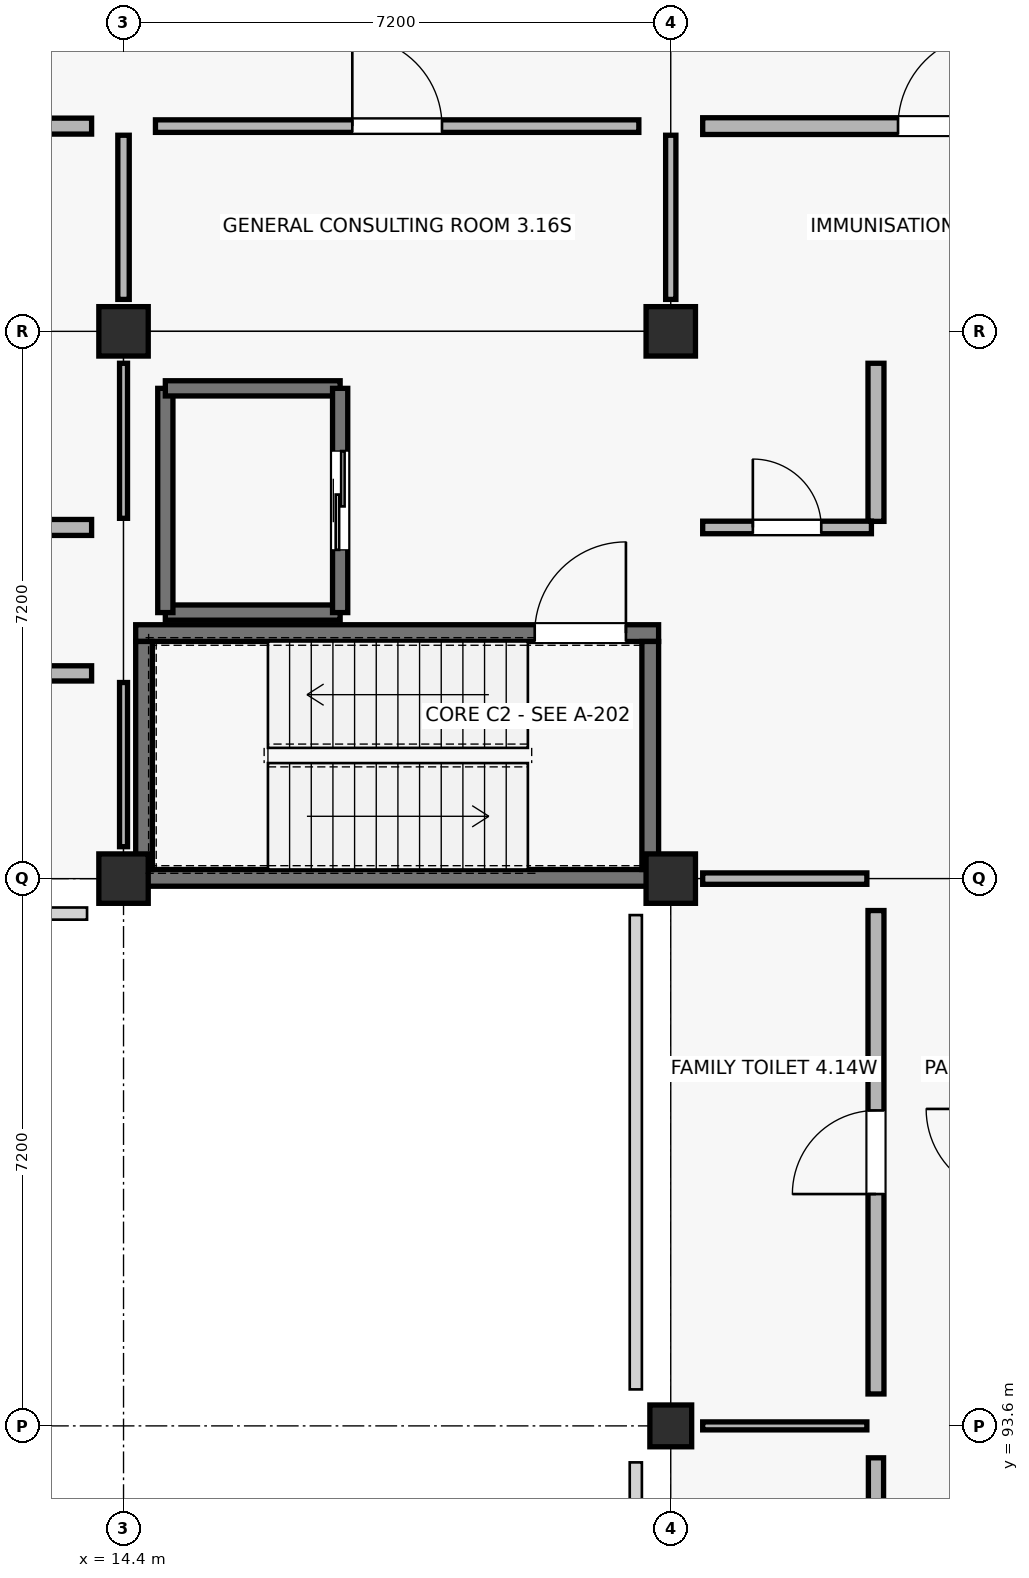
"""IFC4 building model, lengths in metres.
Left out: names, types, materials, properties, quantities, classifications, styles, units other than length and angle.
Written with IfcOpenShell. Run it as: python <this file> out.ifc"""

import sys

from ifc_helpers import new_model, si_unit, direction, frame, frame_2d, origin, origin_2d, place, context, subcontext, project, spatial, rectangle, extrude, element, fill, save


model = new_model("IFC4")
c1 = context("Model", 3, precision=1e-05, world=origin(), true_north=direction((0.0, 1.0)))
c2 = subcontext(c1, "Body", "Model", "MODEL_VIEW")
j1 = project(units=[si_unit("LENGTHUNIT", "METRE"), si_unit("PLANEANGLEUNIT", "RADIAN")], contexts=[c1])
p1 = place(None, origin())
s1 = spatial("IfcSite", under=j1, at=p1, CompositionType="ELEMENT")
p2 = place(p1, origin())
s2 = spatial("IfcBuilding", under=s1, at=p2, CompositionType="ELEMENT")
p3 = place(p2, frame((0.0, 0.0, 9.0)))
s3 = spatial("IfcBuildingStorey", under=s2, at=p3, CompositionType="ELEMENT", Elevation=9.0)
for number, where, z_axis, x_axis in (
    (1, (14.4, 100.8, 0.0), (0.0, 0.0, 1.0), (1.0, 0.0, 0.0)),
    (2, (14.4, 108.0, 0.0), (0.0, 0.0, 1.0), (1.0, 0.0, 0.0)),
):
    element("IfcColumn", number, at=place(p3, frame(where, z_axis=z_axis, x_axis=x_axis)), inside=s3, PredefinedType="COLUMN", context=c2, shape_type="SweptSolid", body=[
        extrude(rectangle(XDim=0.65, YDim=0.65, at=origin_2d()), origin(), (0.0, 0.0, 1.0), 4.5),
    ])
p4 = place(p3, frame((21.6, 93.6, 0.0), z_axis=(0.0, 0.0, 1.0), x_axis=(1.0, 0.0, 0.0)))
e3 = element("IfcColumn", 3, at=p4, inside=s3, PredefinedType="COLUMN", context=c2, shape_type="SweptSolid", body=[
    extrude(rectangle(XDim=0.55, YDim=0.55, at=origin_2d()), origin(), (0.0, 0.0, 1.0), 4.5),
])
for number, where, z_axis, x_axis in (
    (4, (21.6, 100.8, 0.0), (0.0, 0.0, 1.0), (1.0, 0.0, 0.0)),
    (5, (21.6, 108.0, 0.0), (0.0, 0.0, 1.0), (1.0, 0.0, 0.0)),
):
    element("IfcColumn", number, at=place(p3, frame(where, z_axis=z_axis, x_axis=x_axis)), inside=s3, PredefinedType="COLUMN", context=c2, shape_type="SweptSolid", body=[
        extrude(rectangle(XDim=0.65, YDim=0.65, at=origin_2d()), origin(), (0.0, 0.0, 1.0), 4.5),
    ])
p5 = place(p3, frame((14.56, 100.81, 0.0), z_axis=(0.0, 0.0, 1.0), x_axis=(1.0, 0.0, 0.0)))
e6 = element("IfcWall", 6, at=p5, inside=s3, PredefinedType="SHEAR", context=c2, shape_type="SweptSolid", body=[
    extrude(rectangle(XDim=6.88, YDim=0.22, at=frame_2d((3.44, 0.0))), origin(), (0.0, 0.0, 1.0), 4.24),
])
p6 = place(p3, frame((14.56, 104.03, 0.0), z_axis=(0.0, 0.0, 1.0), x_axis=(1.0, 0.0, 0.0)))
e7 = element("IfcWall", 7, at=p6, inside=s3, PredefinedType="SHEAR", context=c2, shape_type="SweptSolid", body=[
    extrude(rectangle(XDim=6.88, YDim=0.22, at=frame_2d((3.44, 0.0))), origin(), (0.0, 0.0, 1.0), 4.24),
])
p7 = place(p6, frame((5.25, 0.0, 0.0)))
e8 = element("IfcOpeningElement", 8, at=p7, cuts=e7, PredefinedType="OPENING", context=c2, shape_type="SweptSolid", body=[
    extrude(rectangle(XDim=1.2, YDim=2.15, at=frame_2d((0.6, 1.075))), frame((0.0, 0.12, 0.0), z_axis=(0.0, -1.0, 0.0), x_axis=(1.0, 0.0, 0.0)), (0.0, 0.0, 1.0), 0.24),
])
for number, where, z_axis, x_axis in (
    (9, (14.67, 100.92, 0.0), (0.0, 0.0, 1.0), (0.0, 1.0, 0.0)),
    (10, (21.33, 100.92, 0.0), (0.0, 0.0, 1.0), (0.0, 1.0, 0.0)),
):
    element("IfcWall", number, at=place(p3, frame(where, z_axis=z_axis, x_axis=x_axis)), inside=s3, PredefinedType="SHEAR", context=c2, shape_type="SweptSolid", body=[
        extrude(rectangle(XDim=3.0, YDim=0.22, at=frame_2d((1.5, 0.0))), origin(), (0.0, 0.0, 1.0), 4.24),
    ])
p8 = place(p3, frame((14.95, 104.3, 0.0), z_axis=(0.0, 0.0, 1.0), x_axis=(1.0, 0.0, 0.0)))
e11 = element("IfcWall", 11, at=p8, inside=s3, PredefinedType="SHEAR", context=c2, shape_type="SweptSolid", body=[
    extrude(rectangle(XDim=2.3, YDim=0.2, at=frame_2d((1.15, 0.0))), origin(), (0.0, 0.0, 1.0), 4.24),
])
p9 = place(p3, frame((14.95, 104.3, 0.0), z_axis=(0.0, 0.0, 1.0), x_axis=(0.0, 1.0, 0.0)))
e12 = element("IfcWall", 12, at=p9, inside=s3, PredefinedType="SHEAR", context=c2, shape_type="SweptSolid", body=[
    extrude(rectangle(XDim=2.95, YDim=0.2, at=frame_2d((1.475, 0.0))), origin(), (0.0, 0.0, 1.0), 4.24),
])
p10 = place(p3, frame((14.95, 107.25, 0.0), z_axis=(0.0, 0.0, 1.0), x_axis=(1.0, 0.0, 0.0)))
e13 = element("IfcWall", 13, at=p10, inside=s3, PredefinedType="SHEAR", context=c2, shape_type="SweptSolid", body=[
    extrude(rectangle(XDim=2.3, YDim=0.2, at=frame_2d((1.15, 0.0))), origin(), (0.0, 0.0, 1.0), 4.24),
])
p11 = place(p3, frame((17.25, 104.3, 0.0), z_axis=(0.0, 0.0, 1.0), x_axis=(0.0, 1.0, 0.0)))
e14 = element("IfcWall", 14, at=p11, inside=s3, PredefinedType="SHEAR", context=c2, shape_type="SweptSolid", body=[
    extrude(rectangle(XDim=2.95, YDim=0.2, at=frame_2d((1.475, 0.0))), origin(), (0.0, 0.0, 1.0), 4.24),
])
p12 = place(p11, frame((0.825, 0.0, 0.0)))
e15 = element("IfcOpeningElement", 15, at=p12, cuts=e14, PredefinedType="OPENING", context=c2, shape_type="SweptSolid", body=[
    extrude(rectangle(XDim=1.3, YDim=2.15, at=frame_2d((0.65, 1.075))), frame((0.0, 0.11, 0.0), z_axis=(0.0, -1.0, 0.0), x_axis=(1.0, 0.0, 0.0)), (0.0, 0.0, 1.0), 0.22),
])
p13 = place(p3, frame((7.62, 103.5, 0.0), z_axis=(0.0, 0.0, 1.0), x_axis=(1.0, 0.0, 0.0)))
e16 = element("IfcWall", 16, at=p13, inside=s3, PredefinedType="SOLIDWALL", context=c2, shape_type="SweptSolid", body=[
    extrude(rectangle(XDim=6.36, YDim=0.2, at=frame_2d((3.18, 0.0))), origin(), (0.0, 0.0, 1.0), 3.38),
])
p14 = place(p13, frame((2.71, 0.0, 0.0)))
e17 = element("IfcOpeningElement", 17, at=p14, cuts=e16, PredefinedType="OPENING", context=c2, shape_type="SweptSolid", body=[
    extrude(rectangle(XDim=0.94, YDim=2.09, at=frame_2d((0.47, 1.045))), frame((0.0, 0.11, 0.0), z_axis=(0.0, -1.0, 0.0), x_axis=(1.0, 0.0, 0.0)), (0.0, 0.0, 1.0), 0.22),
])
p15 = place(p3, frame((14.4, 101.22, 0.0), z_axis=(0.0, 0.0, 1.0), x_axis=(0.0, 1.0, 0.0)))
e18 = element("IfcWall", 18, at=p15, inside=s3, PredefinedType="PARTITIONING", context=c2, shape_type="SweptSolid", body=[
    extrude(rectangle(XDim=2.16, YDim=0.105, at=frame_2d((1.08, 0.0))), origin(), (0.0, 0.0, 1.0), 3.38),
])
p16 = place(p3, frame((7.62, 105.42, 0.0), z_axis=(0.0, 0.0, 1.0), x_axis=(1.0, 0.0, 0.0)))
e19 = element("IfcWall", 19, at=p16, inside=s3, PredefinedType="PLUMBINGWALL", context=c2, shape_type="SweptSolid", body=[
    extrude(rectangle(XDim=6.36, YDim=0.21, at=frame_2d((3.18, 0.0))), origin(), (0.0, 0.0, 1.0), 3.38),
])
p17 = place(p16, frame((2.69, 0.0, 0.0)))
e20 = element("IfcOpeningElement", 20, at=p17, cuts=e19, PredefinedType="OPENING", context=c2, shape_type="SweptSolid", body=[
    extrude(rectangle(XDim=0.98, YDim=2.09, at=frame_2d((0.49, 1.045))), frame((0.0, 0.115, 0.0), z_axis=(0.0, -1.0, 0.0), x_axis=(1.0, 0.0, 0.0)), (0.0, 0.0, 1.0), 0.23),
])
p18 = place(p3, frame((14.4, 105.54, 0.0), z_axis=(0.0, 0.0, 1.0), x_axis=(0.0, 1.0, 0.0)))
e21 = element("IfcWall", 21, at=p18, inside=s3, PredefinedType="PARTITIONING", context=c2, shape_type="SweptSolid", body=[
    extrude(rectangle(XDim=2.04, YDim=0.105, at=frame_2d((1.02, 0.0))), origin(), (0.0, 0.0, 1.0), 3.38),
])
p19 = place(p3, frame((7.62, 110.7, 0.0), z_axis=(0.0, 0.0, 1.0), x_axis=(1.0, 0.0, 0.0)))
e22 = element("IfcWall", 22, at=p19, inside=s3, PredefinedType="PLUMBINGWALL", context=c2, shape_type="SweptSolid", body=[
    extrude(rectangle(XDim=6.36, YDim=0.21, at=frame_2d((3.18, 0.0))), origin(), (0.0, 0.0, 1.0), 3.38),
])
p20 = place(p19, frame((2.67, 0.0, 0.0)))
e23 = element("IfcOpeningElement", 23, at=p20, cuts=e22, PredefinedType="OPENING", context=c2, shape_type="SweptSolid", body=[
    extrude(rectangle(XDim=1.02, YDim=2.09, at=frame_2d((0.51, 1.045))), frame((0.0, 0.115, 0.0), z_axis=(0.0, -1.0, 0.0), x_axis=(1.0, 0.0, 0.0)), (0.0, 0.0, 1.0), 0.23),
])
p21 = place(p3, frame((14.4, 108.42, 0.0), z_axis=(0.0, 0.0, 1.0), x_axis=(0.0, 1.0, 0.0)))
e24 = element("IfcWall", 24, at=p21, inside=s3, PredefinedType="PARTITIONING", context=c2, shape_type="SweptSolid", body=[
    extrude(rectangle(XDim=2.16, YDim=0.15, at=frame_2d((1.08, 0.0))), origin(), (0.0, 0.0, 1.0), 3.38),
])
p22 = place(p3, frame((14.82, 110.7, 0.0), z_axis=(0.0, 0.0, 1.0), x_axis=(1.0, 0.0, 0.0)))
e25 = element("IfcWall", 25, at=p22, inside=s3, PredefinedType="PARTITIONING", context=c2, shape_type="SweptSolid", body=[
    extrude(rectangle(XDim=6.36, YDim=0.165, at=frame_2d((3.18, 0.0))), origin(), (0.0, 0.0, 1.0), 3.38),
])
p23 = place(p22, frame((2.59, 0.0, 0.0)))
e26 = element("IfcOpeningElement", 26, at=p23, cuts=e25, PredefinedType="OPENING", context=c2, shape_type="SweptSolid", body=[
    extrude(rectangle(XDim=1.18, YDim=2.09, at=frame_2d((0.59, 1.045))), frame((0.0, 0.093, 0.0), z_axis=(0.0, -1.0, 0.0), x_axis=(1.0, 0.0, 0.0)), (0.0, 0.0, 1.0), 0.185),
])
p24 = place(p3, frame((21.6, 108.42, 0.0), z_axis=(0.0, 0.0, 1.0), x_axis=(0.0, 1.0, 0.0)))
e27 = element("IfcWall", 27, at=p24, inside=s3, PredefinedType="PARTITIONING", context=c2, shape_type="SweptSolid", body=[
    extrude(rectangle(XDim=2.16, YDim=0.135, at=frame_2d((1.08, 0.0))), origin(), (0.0, 0.0, 1.0), 3.38),
])
p25 = place(p3, frame((24.3, 86.82, 0.0), z_axis=(0.0, 0.0, 1.0), x_axis=(0.0, 1.0, 0.0)))
e28 = element("IfcWall", 28, at=p25, inside=s3, PredefinedType="SOLIDWALL", context=c2, shape_type="SweptSolid", body=[
    extrude(rectangle(XDim=6.36, YDim=0.2, at=frame_2d((3.18, 0.0))), origin(), (0.0, 0.0, 1.0), 3.38),
])
p26 = place(p25, frame((2.67, 0.0, 0.0)))
e29 = element("IfcOpeningElement", 29, at=p26, cuts=e28, PredefinedType="OPENING", context=c2, shape_type="SweptSolid", body=[
    extrude(rectangle(XDim=1.02, YDim=2.14, at=frame_2d((0.51, 1.07))), frame((0.0, 0.11, 0.0), z_axis=(0.0, -1.0, 0.0), x_axis=(1.0, 0.0, 0.0)), (0.0, 0.0, 1.0), 0.22),
])
p27 = place(p3, frame((22.02, 93.6, 0.0), z_axis=(0.0, 0.0, 1.0), x_axis=(1.0, 0.0, 0.0)))
e30 = element("IfcWall", 30, at=p27, inside=s3, PredefinedType="PARTITIONING", context=c2, shape_type="SweptSolid", body=[
    extrude(rectangle(XDim=2.16, YDim=0.105, at=frame_2d((1.08, 0.0))), origin(), (0.0, 0.0, 1.0), 3.38),
])
p28 = place(p3, frame((24.3, 94.02, 0.0), z_axis=(0.0, 0.0, 1.0), x_axis=(0.0, 1.0, 0.0)))
e31 = element("IfcWall", 31, at=p28, inside=s3, PredefinedType="PLUMBINGWALL", context=c2, shape_type="SweptSolid", body=[
    extrude(rectangle(XDim=6.36, YDim=0.21, at=frame_2d((3.18, 0.0))), origin(), (0.0, 0.0, 1.0), 3.38),
])
p29 = place(p28, frame((2.63, 0.0, 0.0)))
e32 = element("IfcOpeningElement", 32, at=p29, cuts=e31, PredefinedType="OPENING", context=c2, shape_type="SweptSolid", body=[
    extrude(rectangle(XDim=1.1, YDim=2.14, at=frame_2d((0.55, 1.07))), frame((0.0, 0.115, 0.0), z_axis=(0.0, -1.0, 0.0), x_axis=(1.0, 0.0, 0.0)), (0.0, 0.0, 1.0), 0.23),
])
p30 = place(p3, frame((22.02, 100.8, 0.0), z_axis=(0.0, 0.0, 1.0), x_axis=(1.0, 0.0, 0.0)))
e33 = element("IfcWall", 33, at=p30, inside=s3, PredefinedType="PARTITIONING", context=c2, shape_type="SweptSolid", body=[
    extrude(rectangle(XDim=2.16, YDim=0.15, at=frame_2d((1.08, 0.0))), origin(), (0.0, 0.0, 1.0), 3.38),
])
p31 = place(p3, frame((24.3, 105.5, 0.0), z_axis=(0.0, 0.0, 1.0), x_axis=(0.0, 1.0, 0.0)))
e34 = element("IfcWall", 34, at=p31, inside=s3, PredefinedType="PLUMBINGWALL", context=c2, shape_type="SweptSolid", body=[
    extrude(rectangle(XDim=2.08, YDim=0.21, at=frame_2d((1.04, 0.0))), origin(), (0.0, 0.0, 1.0), 3.38),
])
p32 = place(p3, frame((22.02, 105.42, 0.0), z_axis=(0.0, 0.0, 1.0), x_axis=(1.0, 0.0, 0.0)))
e35 = element("IfcWall", 35, at=p32, inside=s3, PredefinedType="PARTITIONING", context=c2, shape_type="SweptSolid", body=[
    extrude(rectangle(XDim=2.22, YDim=0.165, at=frame_2d((1.11, 0.0))), origin(), (0.0, 0.0, 1.0), 3.38),
])
p33 = place(p32, frame((0.66, 0.0, 0.0)))
e36 = element("IfcOpeningElement", 36, at=p33, cuts=e35, PredefinedType="OPENING", context=c2, shape_type="SweptSolid", body=[
    extrude(rectangle(XDim=0.9, YDim=2.04, at=frame_2d((0.45, 1.02))), frame((0.0, 0.093, 0.0), z_axis=(0.0, -1.0, 0.0), x_axis=(1.0, 0.0, 0.0)), (0.0, 0.0, 1.0), 0.185),
])
p34 = place(p3, frame((22.02, 110.7, 0.0), z_axis=(0.0, 0.0, 1.0), x_axis=(1.0, 0.0, 0.0)))
e37 = element("IfcWall", 37, at=p34, inside=s3, PredefinedType="SOLIDWALL", context=c2, shape_type="SweptSolid", body=[
    extrude(rectangle(XDim=6.36, YDim=0.22, at=frame_2d((3.18, 0.0))), origin(), (0.0, 0.0, 1.0), 3.38),
])
p35 = place(p34, frame((2.57, 0.0, 0.0)))
e38 = element("IfcOpeningElement", 38, at=p35, cuts=e37, PredefinedType="OPENING", context=c2, shape_type="SweptSolid", body=[
    extrude(rectangle(XDim=1.22, YDim=2.14, at=frame_2d((0.61, 1.07))), frame((0.0, 0.12, 0.0), z_axis=(0.0, -1.0, 0.0), x_axis=(1.0, 0.0, 0.0)), (0.0, 0.0, 1.0), 0.24),
])
p36 = place(p7, origin())
e39 = element("IfcDoor", 39, at=p36, inside=s3, OperationType="SINGLE_SWING_RIGHT", PredefinedType="DOOR", context=c2, shape_type="SweptSolid", body=[
    extrude(rectangle(XDim=1.2, YDim=2.15, at=frame_2d((0.6, 1.075))), frame((0.0, 0.025, 0.0), z_axis=(0.0, -1.0, 0.0), x_axis=(1.0, 0.0, 0.0)), (0.0, 0.0, 1.0), 0.05),
])
fill(e8, e39)
p37 = place(p12, origin())
e40 = element("IfcDoor", 40, at=p37, inside=s3, OperationType="SLIDING_TO_LEFT", PredefinedType="DOOR", context=c2, shape_type="SweptSolid", body=[
    extrude(rectangle(XDim=1.3, YDim=2.15, at=frame_2d((0.65, 1.075))), frame((0.0, 0.025, 0.0), z_axis=(0.0, -1.0, 0.0), x_axis=(1.0, 0.0, 0.0)), (0.0, 0.0, 1.0), 0.05),
])
fill(e15, e40)
p38 = place(p23, origin())
e41 = element("IfcDoor", 41, at=p38, inside=s3, OperationType="SINGLE_SWING_LEFT", PredefinedType="DOOR", context=c2, shape_type="SweptSolid", body=[
    extrude(rectangle(XDim=1.18, YDim=2.09, at=frame_2d((0.59, 1.045))), frame((0.0, 0.025, 0.0), z_axis=(0.0, -1.0, 0.0), x_axis=(1.0, 0.0, 0.0)), (0.0, 0.0, 1.0), 0.05),
])
fill(e26, e41)
p39 = place(p29, origin())
e42 = element("IfcDoor", 42, at=p39, inside=s3, OperationType="SINGLE_SWING_LEFT", PredefinedType="DOOR", context=c2, shape_type="SweptSolid", body=[
    extrude(rectangle(XDim=1.1, YDim=2.14, at=frame_2d((0.55, 1.07))), frame((0.0, 0.025, 0.0), z_axis=(0.0, -1.0, 0.0), x_axis=(1.0, 0.0, 0.0)), (0.0, 0.0, 1.0), 0.05),
])
fill(e32, e42)
p40 = place(p33, origin())
e43 = element("IfcDoor", 43, at=p40, inside=s3, OperationType="SINGLE_SWING_LEFT", PredefinedType="DOOR", context=c2, shape_type="SweptSolid", body=[
    extrude(rectangle(XDim=0.9, YDim=2.04, at=frame_2d((0.45, 1.02))), frame((0.0, 0.025, 0.0), z_axis=(0.0, -1.0, 0.0), x_axis=(1.0, 0.0, 0.0)), (0.0, 0.0, 1.0), 0.05),
])
fill(e36, e43)
p41 = place(p35, origin())
e44 = element("IfcDoor", 44, at=p41, inside=s3, OperationType="SINGLE_SWING_RIGHT", PredefinedType="DOOR", context=c2, shape_type="SweptSolid", body=[
    extrude(rectangle(XDim=1.22, YDim=2.14, at=frame_2d((0.61, 1.07))), frame((0.0, 0.025, 0.0), z_axis=(0.0, -1.0, 0.0), x_axis=(1.0, 0.0, 0.0)), (0.0, 0.0, 1.0), 0.05),
])
fill(e38, e44)
save(model, sys.argv[1])
